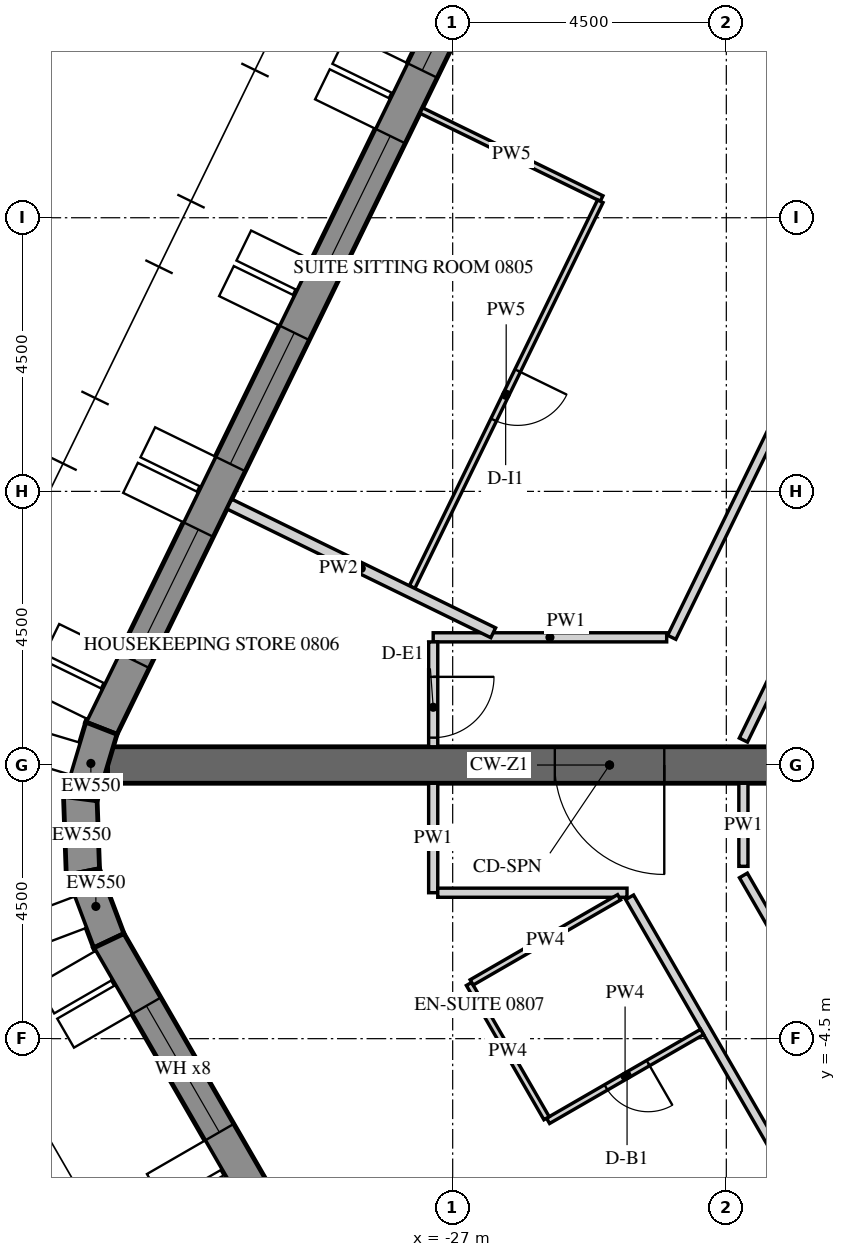
"""IFC4 building model, lengths in metres.
Left out: names, types, materials, properties, quantities, classifications, styles, units other than length and angle.
Written with IfcOpenShell. Run it as: python <this file> out.ifc"""

import sys

from ifc_helpers import new_model, si_unit, direction, frame, frame_2d, origin, place, context, subcontext, project, spatial, polyline, rectangle, outline, extrude, element, fill, save


model = new_model("IFC4")
c1 = context("Model", 3, precision=1e-05, world=origin(), true_north=direction((0.0, 1.0)))
c2 = subcontext(c1, "Body", "Model", "MODEL_VIEW")
j1 = project(units=[si_unit("LENGTHUNIT", "METRE"), si_unit("PLANEANGLEUNIT", "RADIAN")], contexts=[c1])
p1 = place(None, origin())
s1 = spatial("IfcSite", under=j1, at=p1, CompositionType="ELEMENT")
p2 = place(p1, origin())
s2 = spatial("IfcBuilding", under=s1, at=p2, CompositionType="ELEMENT")
p3 = place(p2, frame((0.0, 0.0, 111.6)))
s3 = spatial("IfcBuildingStorey", under=s2, at=p3, CompositionType="ELEMENT", Elevation=111.6)
p4 = place(p3, frame((-19.595, 27.633, -0.15), z_axis=(0.0, 0.0, 1.0), x_axis=(-0.438368285794, -0.898795441694, 0.0)))
e1 = element("IfcWall", 1, at=p4, inside=s3, PredefinedType="SOLIDWALL", context=c2, shape_type="SweptSolid", body=[
    extrude(outline(polyline([(-0.026, -0.275), (30.093, -0.275), (30.048, 0.275), (0.026, 0.275), (-0.026, -0.275)])), origin(), (0.0, 0.0, 1.0), 3.9),
])
p5 = place(p4, frame((1.236, 0.0, 1.05)))
e2 = element("IfcOpeningElement", 2, at=p5, cuts=e1, PredefinedType="OPENING", context=c2, shape_type="SweptSolid", body=[
    extrude(rectangle(XDim=2.4, YDim=2.4, at=frame_2d((1.2, 1.2))), frame((0.0, 0.285, 0.0), z_axis=(0.0, -1.0, 0.0), x_axis=(1.0, 0.0, 0.0)), (0.0, 0.0, 1.0), 0.57),
])
p6 = place(p4, frame((4.835, 0.0, 1.05)))
e3 = element("IfcOpeningElement", 3, at=p6, cuts=e1, PredefinedType="OPENING", context=c2, shape_type="SweptSolid", body=[
    extrude(rectangle(XDim=2.4, YDim=2.4, at=frame_2d((1.2, 1.2))), frame((0.0, 0.285, 0.0), z_axis=(0.0, -1.0, 0.0), x_axis=(1.0, 0.0, 0.0)), (0.0, 0.0, 1.0), 0.57),
])
p7 = place(p4, frame((8.436, 0.0, 1.05)))
e4 = element("IfcOpeningElement", 4, at=p7, cuts=e1, PredefinedType="OPENING", context=c2, shape_type="SweptSolid", body=[
    extrude(rectangle(XDim=2.4, YDim=2.4, at=frame_2d((1.2, 1.2))), frame((0.0, 0.285, 0.0), z_axis=(0.0, -1.0, 0.0), x_axis=(1.0, 0.0, 0.0)), (0.0, 0.0, 1.0), 0.57),
])
p8 = place(p4, frame((12.035, 0.0, 1.05)))
e5 = element("IfcOpeningElement", 5, at=p8, cuts=e1, PredefinedType="OPENING", context=c2, shape_type="SweptSolid", body=[
    extrude(rectangle(XDim=2.4, YDim=2.4, at=frame_2d((1.2, 1.2))), frame((0.0, 0.285, 0.0), z_axis=(0.0, -1.0, 0.0), x_axis=(1.0, 0.0, 0.0)), (0.0, 0.0, 1.0), 0.57),
])
p9 = place(p4, frame((15.635, 0.0, 1.05)))
e6 = element("IfcOpeningElement", 6, at=p9, cuts=e1, PredefinedType="OPENING", context=c2, shape_type="SweptSolid", body=[
    extrude(rectangle(XDim=2.4, YDim=2.4, at=frame_2d((1.2, 1.2))), frame((0.0, 0.285, 0.0), z_axis=(0.0, -1.0, 0.0), x_axis=(1.0, 0.0, 0.0)), (0.0, 0.0, 1.0), 0.57),
])
p10 = place(p4, frame((19.236, 0.0, 1.05)))
e7 = element("IfcOpeningElement", 7, at=p10, cuts=e1, PredefinedType="OPENING", context=c2, shape_type="SweptSolid", body=[
    extrude(rectangle(XDim=2.4, YDim=2.4, at=frame_2d((1.2, 1.2))), frame((0.0, 0.285, 0.0), z_axis=(0.0, -1.0, 0.0), x_axis=(1.0, 0.0, 0.0)), (0.0, 0.0, 1.0), 0.57),
])
p11 = place(p4, frame((22.835, 0.0, 1.05)))
e8 = element("IfcOpeningElement", 8, at=p11, cuts=e1, PredefinedType="OPENING", context=c2, shape_type="SweptSolid", body=[
    extrude(rectangle(XDim=2.4, YDim=2.4, at=frame_2d((1.2, 1.2))), frame((0.0, 0.285, 0.0), z_axis=(0.0, -1.0, 0.0), x_axis=(1.0, 0.0, 0.0)), (0.0, 0.0, 1.0), 0.57),
])
p12 = place(p4, frame((26.436, 0.0, 1.05)))
e9 = element("IfcOpeningElement", 9, at=p12, cuts=e1, PredefinedType="OPENING", context=c2, shape_type="SweptSolid", body=[
    extrude(rectangle(XDim=2.4, YDim=2.4, at=frame_2d((1.2, 1.2))), frame((0.0, 0.285, 0.0), z_axis=(0.0, -1.0, 0.0), x_axis=(1.0, 0.0, 0.0)), (0.0, 0.0, 1.0), 0.57),
])
p13 = place(p3, frame((-32.777, 0.605, -0.15), z_axis=(0.0, 0.0, 1.0), x_axis=(-0.286921497463, -0.957954098219, 0.0)))
e10 = element("IfcWall", 10, at=p13, inside=s3, PredefinedType="SOLIDWALL", context=c2, shape_type="SweptSolid", body=[
    extrude(outline(polyline([(-0.022, -0.275), (1.253, -0.275), (1.163, 0.275), (0.022, 0.275), (-0.022, -0.275)])), origin(), (0.0, 0.0, 1.0), 3.9),
])
p14 = place(p3, frame((-33.124, -0.552, -0.15), z_axis=(0.0, 0.0, 1.0), x_axis=(0.03495638276, -0.999388838893, 0.0)))
e11 = element("IfcWall", 11, at=p14, inside=s3, PredefinedType="SOLIDWALL", context=c2, shape_type="SweptSolid", body=[
    extrude(outline(polyline([(-0.045, -0.275), (1.253, -0.275), (1.163, 0.275), (0.045, 0.275), (-0.045, -0.275)])), origin(), (0.0, 0.0, 1.0), 3.9),
])
p15 = place(p3, frame((-33.081, -1.76, -0.15), z_axis=(0.0, 0.0, 1.0), x_axis=(0.353027214741, -0.935613053378, 0.0)))
e12 = element("IfcWall", 12, at=p15, inside=s3, PredefinedType="SOLIDWALL", context=c2, shape_type="SweptSolid", body=[
    extrude(outline(polyline([(-0.045, -0.275), (1.231, -0.275), (1.186, 0.275), (0.045, 0.275), (-0.045, -0.275)])), origin(), (0.0, 0.0, 1.0), 3.9),
])
p16 = place(p3, frame((-32.655, -2.89, -0.15), z_axis=(0.0, 0.0, 1.0), x_axis=(0.499997711317, -0.866026725152, 0.0)))
e13 = element("IfcWall", 13, at=p16, inside=s3, PredefinedType="SOLIDWALL", context=c2, shape_type="SweptSolid", body=[
    extrude(outline(polyline([(-0.022, -0.275), (30.097, -0.275), (30.045, 0.275), (0.022, 0.275), (-0.022, -0.275)])), origin(), (0.0, 0.0, 1.0), 3.9),
])
p17 = place(p16, frame((1.236, 0.0, 1.05)))
e14 = element("IfcOpeningElement", 14, at=p17, cuts=e13, PredefinedType="OPENING", context=c2, shape_type="SweptSolid", body=[
    extrude(rectangle(XDim=2.4, YDim=2.4, at=frame_2d((1.2, 1.2))), frame((0.0, 0.285, 0.0), z_axis=(0.0, -1.0, 0.0), x_axis=(1.0, 0.0, 0.0)), (0.0, 0.0, 1.0), 0.57),
])
p18 = place(p16, frame((4.835, 0.0, 1.05)))
e15 = element("IfcOpeningElement", 15, at=p18, cuts=e13, PredefinedType="OPENING", context=c2, shape_type="SweptSolid", body=[
    extrude(rectangle(XDim=2.4, YDim=2.4, at=frame_2d((1.2, 1.2))), frame((0.0, 0.285, 0.0), z_axis=(0.0, -1.0, 0.0), x_axis=(1.0, 0.0, 0.0)), (0.0, 0.0, 1.0), 0.57),
])
p19 = place(p16, frame((8.436, 0.0, 1.05)))
e16 = element("IfcOpeningElement", 16, at=p19, cuts=e13, PredefinedType="OPENING", context=c2, shape_type="SweptSolid", body=[
    extrude(rectangle(XDim=2.4, YDim=2.4, at=frame_2d((1.2, 1.2))), frame((0.0, 0.285, 0.0), z_axis=(0.0, -1.0, 0.0), x_axis=(1.0, 0.0, 0.0)), (0.0, 0.0, 1.0), 0.57),
])
p20 = place(p16, frame((12.035, 0.0, 1.05)))
e17 = element("IfcOpeningElement", 17, at=p20, cuts=e13, PredefinedType="OPENING", context=c2, shape_type="SweptSolid", body=[
    extrude(rectangle(XDim=2.4, YDim=2.4, at=frame_2d((1.2, 1.2))), frame((0.0, 0.285, 0.0), z_axis=(0.0, -1.0, 0.0), x_axis=(1.0, 0.0, 0.0)), (0.0, 0.0, 1.0), 0.57),
])
p21 = place(p16, frame((15.635, 0.0, 1.05)))
e18 = element("IfcOpeningElement", 18, at=p21, cuts=e13, PredefinedType="OPENING", context=c2, shape_type="SweptSolid", body=[
    extrude(rectangle(XDim=2.4, YDim=2.4, at=frame_2d((1.2, 1.2))), frame((0.0, 0.285, 0.0), z_axis=(0.0, -1.0, 0.0), x_axis=(1.0, 0.0, 0.0)), (0.0, 0.0, 1.0), 0.57),
])
p22 = place(p16, frame((19.236, 0.0, 1.05)))
e19 = element("IfcOpeningElement", 19, at=p22, cuts=e13, PredefinedType="OPENING", context=c2, shape_type="SweptSolid", body=[
    extrude(rectangle(XDim=2.4, YDim=2.4, at=frame_2d((1.2, 1.2))), frame((0.0, 0.285, 0.0), z_axis=(0.0, -1.0, 0.0), x_axis=(1.0, 0.0, 0.0)), (0.0, 0.0, 1.0), 0.57),
])
p23 = place(p16, frame((22.835, 0.0, 1.05)))
e20 = element("IfcOpeningElement", 20, at=p23, cuts=e13, PredefinedType="OPENING", context=c2, shape_type="SweptSolid", body=[
    extrude(rectangle(XDim=2.4, YDim=2.4, at=frame_2d((1.2, 1.2))), frame((0.0, 0.285, 0.0), z_axis=(0.0, -1.0, 0.0), x_axis=(1.0, 0.0, 0.0)), (0.0, 0.0, 1.0), 0.57),
])
p24 = place(p16, frame((26.436, 0.0, 1.05)))
e21 = element("IfcOpeningElement", 21, at=p24, cuts=e13, PredefinedType="OPENING", context=c2, shape_type="SweptSolid", body=[
    extrude(rectangle(XDim=2.4, YDim=2.4, at=frame_2d((1.2, 1.2))), frame((0.0, 0.285, 0.0), z_axis=(0.0, -1.0, 0.0), x_axis=(1.0, 0.0, 0.0)), (0.0, 0.0, 1.0), 0.57),
])
p25 = place(p3, frame((-16.166, 0.0, -0.15), z_axis=(0.0, 0.0, 1.0), x_axis=(-1.0, 0.0, 0.0)))
e22 = element("IfcWall", 22, at=p25, inside=s3, PredefinedType="SHEAR", context=c2, shape_type="SweptSolid", body=[
    extrude(rectangle(XDim=16.509, YDim=0.6, at=frame_2d((8.254, 0.0))), origin(), (0.0, 0.0, 1.0), 3.9),
])
p26 = place(p25, frame((7.354, 0.0, 0.15)))
e23 = element("IfcOpeningElement", 23, at=p26, cuts=e22, PredefinedType="OPENING", context=c2, shape_type="SweptSolid", body=[
    extrude(rectangle(XDim=1.8, YDim=2.4, at=frame_2d((0.9, 1.2))), frame((0.0, 0.31, 0.0), z_axis=(0.0, -1.0, 0.0), x_axis=(1.0, 0.0, 0.0)), (0.0, 0.0, 1.0), 0.62),
])
p27 = place(p3, frame((-13.752, 21.875, 0.0), z_axis=(0.0, 0.0, 1.0), x_axis=(-0.438376846054, -0.898791266559, 0.0)))
e24 = element("IfcWall", 24, at=p27, inside=s3, PredefinedType="PARTITIONING", context=c2, shape_type="SweptSolid", body=[
    extrude(rectangle(XDim=22.002, YDim=0.15, at=frame_2d((11.001, 0.0))), origin(), (0.0, 0.0, 1.0), 2.988),
])
p28 = place(p27, frame((5.169, 0.0, 0.0)))
e25 = element("IfcOpeningElement", 25, at=p28, cuts=e24, PredefinedType="OPENING", context=c2, shape_type="SweptSolid", body=[
    extrude(rectangle(XDim=1.0, YDim=2.1, at=frame_2d((0.5, 1.05))), frame((0.0, 0.085, 0.0), z_axis=(0.0, -1.0, 0.0), x_axis=(1.0, 0.0, 0.0)), (0.0, 0.0, 1.0), 0.17),
])
p29 = place(p27, frame((16.112, 0.0, 0.0)))
e26 = element("IfcOpeningElement", 26, at=p29, cuts=e24, PredefinedType="OPENING", context=c2, shape_type="SweptSolid", body=[
    extrude(rectangle(XDim=1.0, YDim=2.1, at=frame_2d((0.5, 1.05))), frame((0.0, 0.085, 0.0), z_axis=(0.0, -1.0, 0.0), x_axis=(1.0, 0.0, 0.0)), (0.0, 0.0, 1.0), 0.17),
])
p30 = place(p3, frame((-23.481, 2.1, 0.0), z_axis=(0.0, 0.0, 1.0), x_axis=(-1.0, 0.0, 0.0)))
e27 = element("IfcWall", 27, at=p30, inside=s3, PredefinedType="PARTITIONING", context=c2, shape_type="SweptSolid", body=[
    extrude(rectangle(XDim=3.84, YDim=0.15, at=frame_2d((1.92, 0.0))), origin(), (0.0, 0.0, 1.0), 2.988),
])
p31 = place(p3, frame((-27.32, 2.025, 0.0), z_axis=(0.0, 0.0, 1.0), x_axis=(0.0, -1.0, 0.0)))
e28 = element("IfcWall", 28, at=p31, inside=s3, PredefinedType="PARTITIONING", context=c2, shape_type="SweptSolid", body=[
    extrude(rectangle(XDim=1.725, YDim=0.15, at=frame_2d((0.862, 0.0))), origin(), (0.0, 0.0, 1.0), 2.988),
])
p32 = place(p31, frame((0.575, 0.0, 0.0)))
e29 = element("IfcOpeningElement", 29, at=p32, cuts=e28, PredefinedType="OPENING", context=c2, shape_type="SweptSolid", body=[
    extrude(rectangle(XDim=1.0, YDim=2.1, at=frame_2d((0.5, 1.05))), frame((0.0, 0.085, 0.0), z_axis=(0.0, -1.0, 0.0), x_axis=(1.0, 0.0, 0.0)), (0.0, 0.0, 1.0), 0.17),
])
p33 = place(p3, frame((-22.219, 0.41, 0.0), z_axis=(0.0, 0.0, 1.0), x_axis=(0.438391891827, 0.898783927972, 0.0)))
e30 = element("IfcWall", 30, at=p33, inside=s3, PredefinedType="PARTITIONING", context=c2, shape_type="SweptSolid", body=[
    extrude(rectangle(XDim=9.699, YDim=0.15, at=frame_2d((4.85, 0.0))), origin(), (0.0, 0.0, 1.0), 2.988),
])
p34 = place(p33, frame((4.4, 0.0, 0.0)))
e31 = element("IfcOpeningElement", 31, at=p34, cuts=e30, PredefinedType="OPENING", context=c2, shape_type="SweptSolid", body=[
    extrude(rectangle(XDim=0.9, YDim=2.1, at=frame_2d((0.45, 1.05))), frame((0.0, 0.085, 0.0), z_axis=(0.0, -1.0, 0.0), x_axis=(1.0, 0.0, 0.0)), (0.0, 0.0, 1.0), 0.17),
])
p35 = place(p3, frame((-27.32, -0.3, 0.0), z_axis=(0.0, 0.0, 1.0), x_axis=(0.0, -1.0, 0.0)))
e32 = element("IfcWall", 32, at=p35, inside=s3, PredefinedType="PARTITIONING", context=c2, shape_type="SweptSolid", body=[
    extrude(rectangle(XDim=1.8, YDim=0.15, at=frame_2d((0.9, 0.0))), origin(), (0.0, 0.0, 1.0), 2.988),
])
p36 = place(p3, frame((-27.245, -2.1, 0.0), z_axis=(0.0, 0.0, 1.0), x_axis=(1.0, 0.0, 0.0)))
e33 = element("IfcWall", 33, at=p36, inside=s3, PredefinedType="PARTITIONING", context=c2, shape_type="SweptSolid", body=[
    extrude(rectangle(XDim=3.112, YDim=0.15, at=frame_2d((1.556, 0.0))), origin(), (0.0, 0.0, 1.0), 2.988),
])
p37 = place(p3, frame((-24.09, -2.175, 0.0), z_axis=(0.0, 0.0, 1.0), x_axis=(0.499996832073, -0.86602723278, 0.0)))
e34 = element("IfcWall", 34, at=p37, inside=s3, PredefinedType="PARTITIONING", context=c2, shape_type="SweptSolid", body=[
    extrude(rectangle(XDim=23.877, YDim=0.15, at=frame_2d((11.938, 0.0))), origin(), (0.0, 0.0, 1.0), 2.988),
])
p38 = place(p37, frame((4.643, 0.0, 0.0)))
e35 = element("IfcOpeningElement", 35, at=p38, cuts=e34, PredefinedType="OPENING", context=c2, shape_type="SweptSolid", body=[
    extrude(rectangle(XDim=1.0, YDim=2.1, at=frame_2d((0.5, 1.05))), frame((0.0, 0.085, 0.0), z_axis=(0.0, -1.0, 0.0), x_axis=(1.0, 0.0, 0.0)), (0.0, 0.0, 1.0), 0.17),
])
p39 = place(p37, frame((11.472, 0.0, 0.0)))
e36 = element("IfcOpeningElement", 36, at=p39, cuts=e34, PredefinedType="OPENING", context=c2, shape_type="SweptSolid", body=[
    extrude(rectangle(XDim=1.0, YDim=2.1, at=frame_2d((0.5, 1.05))), frame((0.0, 0.085, 0.0), z_axis=(0.0, -1.0, 0.0), x_axis=(1.0, 0.0, 0.0)), (0.0, 0.0, 1.0), 0.17),
])
p40 = place(p37, frame((21.925, 0.0, 0.0)))
e37 = element("IfcOpeningElement", 37, at=p40, cuts=e34, PredefinedType="OPENING", context=c2, shape_type="SweptSolid", body=[
    extrude(rectangle(XDim=1.0, YDim=2.1, at=frame_2d((0.5, 1.05))), frame((0.0, 0.085, 0.0), z_axis=(0.0, -1.0, 0.0), x_axis=(1.0, 0.0, 0.0)), (0.0, 0.0, 1.0), 0.17),
])
p41 = place(p3, frame((-18.027, -9.076, 0.0), z_axis=(0.0, 0.0, 1.0), x_axis=(-0.500007318041, 0.86602117867, 0.0)))
e38 = element("IfcWall", 38, at=p41, inside=s3, PredefinedType="PARTITIONING", context=c2, shape_type="SweptSolid", body=[
    extrude(rectangle(XDim=8.383, YDim=0.15, at=frame_2d((4.191, 0.0))), origin(), (0.0, 0.0, 1.0), 2.988),
])
p42 = place(p41, frame((3.742, 0.0, 0.0)))
e39 = element("IfcOpeningElement", 39, at=p42, cuts=e38, PredefinedType="OPENING", context=c2, shape_type="SweptSolid", body=[
    extrude(rectangle(XDim=0.9, YDim=2.1, at=frame_2d((0.45, 1.05))), frame((0.0, 0.085, 0.0), z_axis=(0.0, -1.0, 0.0), x_axis=(1.0, 0.0, 0.0)), (0.0, 0.0, 1.0), 0.17),
])
p43 = place(p3, frame((-22.219, -1.666, 0.0), z_axis=(0.0, 0.0, 1.0), x_axis=(0.0, 1.0, 0.0)))
e40 = element("IfcWall", 40, at=p43, inside=s3, PredefinedType="PARTITIONING", context=c2, shape_type="SweptSolid", body=[
    extrude(rectangle(XDim=1.366, YDim=0.15, at=frame_2d((0.683, 0.0))), origin(), (0.0, 0.0, 1.0), 2.988),
])
p44 = place(p3, frame((-27.517, 10.763, 0.0), z_axis=(0.0, 0.0, 1.0), x_axis=(0.898764179314, -0.43843237789, 0.0)))
e41 = element("IfcWall", 41, at=p44, inside=s3, PredefinedType="PARTITIONING", context=c2, shape_type="SweptSolid", body=[
    extrude(rectangle(XDim=3.3, YDim=0.1, at=frame_2d((1.65, 0.0))), origin(), (0.0, 0.0, 1.0), 2.988),
])
p45 = place(p3, frame((-24.573, 9.271, 0.0), z_axis=(0.0, 0.0, 1.0), x_axis=(-0.438380708798, -0.898789382533, 0.0)))
e42 = element("IfcWall", 42, at=p45, inside=s3, PredefinedType="PARTITIONING", context=c2, shape_type="SweptSolid", body=[
    extrude(rectangle(XDim=7.06, YDim=0.1, at=frame_2d((3.53, 0.0))), origin(), (0.0, 0.0, 1.0), 2.988),
])
p46 = place(p45, frame((3.1, 0.0, 0.0)))
e43 = element("IfcOpeningElement", 43, at=p46, cuts=e42, PredefinedType="OPENING", context=c2, shape_type="SweptSolid", body=[
    extrude(rectangle(XDim=0.9, YDim=2.1, at=frame_2d((0.45, 1.05))), frame((0.0, 0.06, 0.0), z_axis=(0.0, -1.0, 0.0), x_axis=(1.0, 0.0, 0.0)), (0.0, 0.0, 1.0), 0.12),
])
p47 = place(p3, frame((-30.673, 4.292, 0.0), z_axis=(0.0, 0.0, 1.0), x_axis=(0.898812662672, -0.438332975512, 0.0)))
e44 = element("IfcWall", 44, at=p47, inside=s3, PredefinedType="PARTITIONING", context=c2, shape_type="SweptSolid", body=[
    extrude(rectangle(XDim=4.828, YDim=0.18, at=frame_2d((2.414, 0.0))), origin(), (0.0, 0.0, 1.0), 2.988),
])
p48 = place(p3, frame((-22.898, -4.389, 0.0), z_axis=(0.0, 0.0, 1.0), x_axis=(-0.866046596414, -0.499963291492, 0.0)))
e45 = element("IfcWall", 45, at=p48, inside=s3, PredefinedType="PARTITIONING", context=c2, shape_type="SweptSolid", body=[
    extrude(rectangle(XDim=2.925, YDim=0.1, at=frame_2d((1.462, 0.0))), origin(), (0.0, 0.0, 1.0), 2.988),
])
p49 = place(p48, frame((1.025, 0.0, 0.0)))
e46 = element("IfcOpeningElement", 46, at=p49, cuts=e45, PredefinedType="OPENING", context=c2, shape_type="SweptSolid", body=[
    extrude(rectangle(XDim=0.8, YDim=2.1, at=frame_2d((0.4, 1.05))), frame((0.0, 0.06, 0.0), z_axis=(0.0, -1.0, 0.0), x_axis=(1.0, 0.0, 0.0)), (0.0, 0.0, 1.0), 0.12),
])
p50 = place(p3, frame((-25.456, -5.808, 0.0), z_axis=(0.0, 0.0, 1.0), x_axis=(-0.499990435942, 0.866030925526, 0.0)))
e47 = element("IfcWall", 47, at=p50, inside=s3, PredefinedType="PARTITIONING", context=c2, shape_type="SweptSolid", body=[
    extrude(rectangle(XDim=2.55, YDim=0.1, at=frame_2d((1.275, 0.0))), origin(), (0.0, 0.0, 1.0), 2.988),
])
p51 = place(p3, frame((-26.688, -3.575, 0.0), z_axis=(0.0, 0.0, 1.0), x_axis=(0.866034573852, 0.49998411664, 0.0)))
e48 = element("IfcWall", 48, at=p51, inside=s3, PredefinedType="PARTITIONING", context=c2, shape_type="SweptSolid", body=[
    extrude(rectangle(XDim=2.8, YDim=0.1, at=frame_2d((1.4, 0.0))), origin(), (0.0, 0.0, 1.0), 2.988),
])
p52 = place(p9, frame((0.0, 0.205, 0.0)))
e49 = element("IfcWindow", 49, at=p52, inside=s3, PartitioningType="DOUBLE_PANEL_VERTICAL", PredefinedType="WINDOW", context=c2, shape_type="SweptSolid", body=[
    extrude(rectangle(XDim=2.4, YDim=2.4, at=frame_2d((1.2, 1.2))), frame((0.0, 0.03, 0.0), z_axis=(0.0, -1.0, 0.0), x_axis=(1.0, 0.0, 0.0)), (0.0, 0.0, 1.0), 0.06),
])
fill(e6, e49)
p53 = place(p10, frame((0.0, 0.205, 0.0)))
e50 = element("IfcWindow", 50, at=p53, inside=s3, PartitioningType="DOUBLE_PANEL_VERTICAL", PredefinedType="WINDOW", context=c2, shape_type="SweptSolid", body=[
    extrude(rectangle(XDim=2.4, YDim=2.4, at=frame_2d((1.2, 1.2))), frame((0.0, 0.03, 0.0), z_axis=(0.0, -1.0, 0.0), x_axis=(1.0, 0.0, 0.0)), (0.0, 0.0, 1.0), 0.06),
])
fill(e7, e50)
p54 = place(p11, frame((0.0, 0.205, 0.0)))
e51 = element("IfcWindow", 51, at=p54, inside=s3, PartitioningType="DOUBLE_PANEL_VERTICAL", PredefinedType="WINDOW", context=c2, shape_type="SweptSolid", body=[
    extrude(rectangle(XDim=2.4, YDim=2.4, at=frame_2d((1.2, 1.2))), frame((0.0, 0.03, 0.0), z_axis=(0.0, -1.0, 0.0), x_axis=(1.0, 0.0, 0.0)), (0.0, 0.0, 1.0), 0.06),
])
fill(e8, e51)
p55 = place(p12, frame((0.0, 0.205, 0.0)))
e52 = element("IfcWindow", 52, at=p55, inside=s3, PartitioningType="DOUBLE_PANEL_VERTICAL", PredefinedType="WINDOW", context=c2, shape_type="SweptSolid", body=[
    extrude(rectangle(XDim=2.4, YDim=2.4, at=frame_2d((1.2, 1.2))), frame((0.0, 0.03, 0.0), z_axis=(0.0, -1.0, 0.0), x_axis=(1.0, 0.0, 0.0)), (0.0, 0.0, 1.0), 0.06),
])
fill(e9, e52)
p56 = place(p17, frame((0.0, 0.205, 0.0)))
e53 = element("IfcWindow", 53, at=p56, inside=s3, PartitioningType="DOUBLE_PANEL_VERTICAL", PredefinedType="WINDOW", context=c2, shape_type="SweptSolid", body=[
    extrude(rectangle(XDim=2.4, YDim=2.4, at=frame_2d((1.2, 1.2))), frame((0.0, 0.03, 0.0), z_axis=(0.0, -1.0, 0.0), x_axis=(1.0, 0.0, 0.0)), (0.0, 0.0, 1.0), 0.06),
])
fill(e14, e53)
p57 = place(p26, origin())
e54 = element("IfcDoor", 54, at=p57, inside=s3, OperationType="DOUBLE_DOOR_SINGLE_SWING", PredefinedType="DOOR", context=c2, shape_type="SweptSolid", body=[
    extrude(rectangle(XDim=1.8, YDim=2.4, at=frame_2d((0.9, 1.2))), frame((0.0, 0.025, 0.0), z_axis=(0.0, -1.0, 0.0), x_axis=(1.0, 0.0, 0.0)), (0.0, 0.0, 1.0), 0.05),
])
fill(e23, e54)
p58 = place(p46, origin())
e55 = element("IfcDoor", 55, at=p58, inside=s3, OperationType="SINGLE_SWING_RIGHT", PredefinedType="DOOR", context=c2, shape_type="SweptSolid", body=[
    extrude(rectangle(XDim=0.9, YDim=2.1, at=frame_2d((0.45, 1.05))), frame((0.0, 0.025, 0.0), z_axis=(0.0, -1.0, 0.0), x_axis=(1.0, 0.0, 0.0)), (0.0, 0.0, 1.0), 0.05),
])
fill(e43, e55)
p59 = place(p32, origin())
e56 = element("IfcDoor", 56, at=p59, inside=s3, OperationType="SINGLE_SWING_LEFT", PredefinedType="DOOR", context=c2, shape_type="SweptSolid", body=[
    extrude(rectangle(XDim=1.0, YDim=2.1, at=frame_2d((0.5, 1.05))), frame((0.0, 0.025, 0.0), z_axis=(0.0, -1.0, 0.0), x_axis=(1.0, 0.0, 0.0)), (0.0, 0.0, 1.0), 0.05),
])
fill(e29, e56)
p60 = place(p49, origin())
e57 = element("IfcDoor", 57, at=p60, inside=s3, OperationType="SINGLE_SWING_RIGHT", PredefinedType="DOOR", context=c2, shape_type="SweptSolid", body=[
    extrude(rectangle(XDim=0.8, YDim=2.1, at=frame_2d((0.4, 1.05))), frame((0.0, 0.025, 0.0), z_axis=(0.0, -1.0, 0.0), x_axis=(1.0, 0.0, 0.0)), (0.0, 0.0, 1.0), 0.05),
])
fill(e46, e57)
save(model, sys.argv[1])
